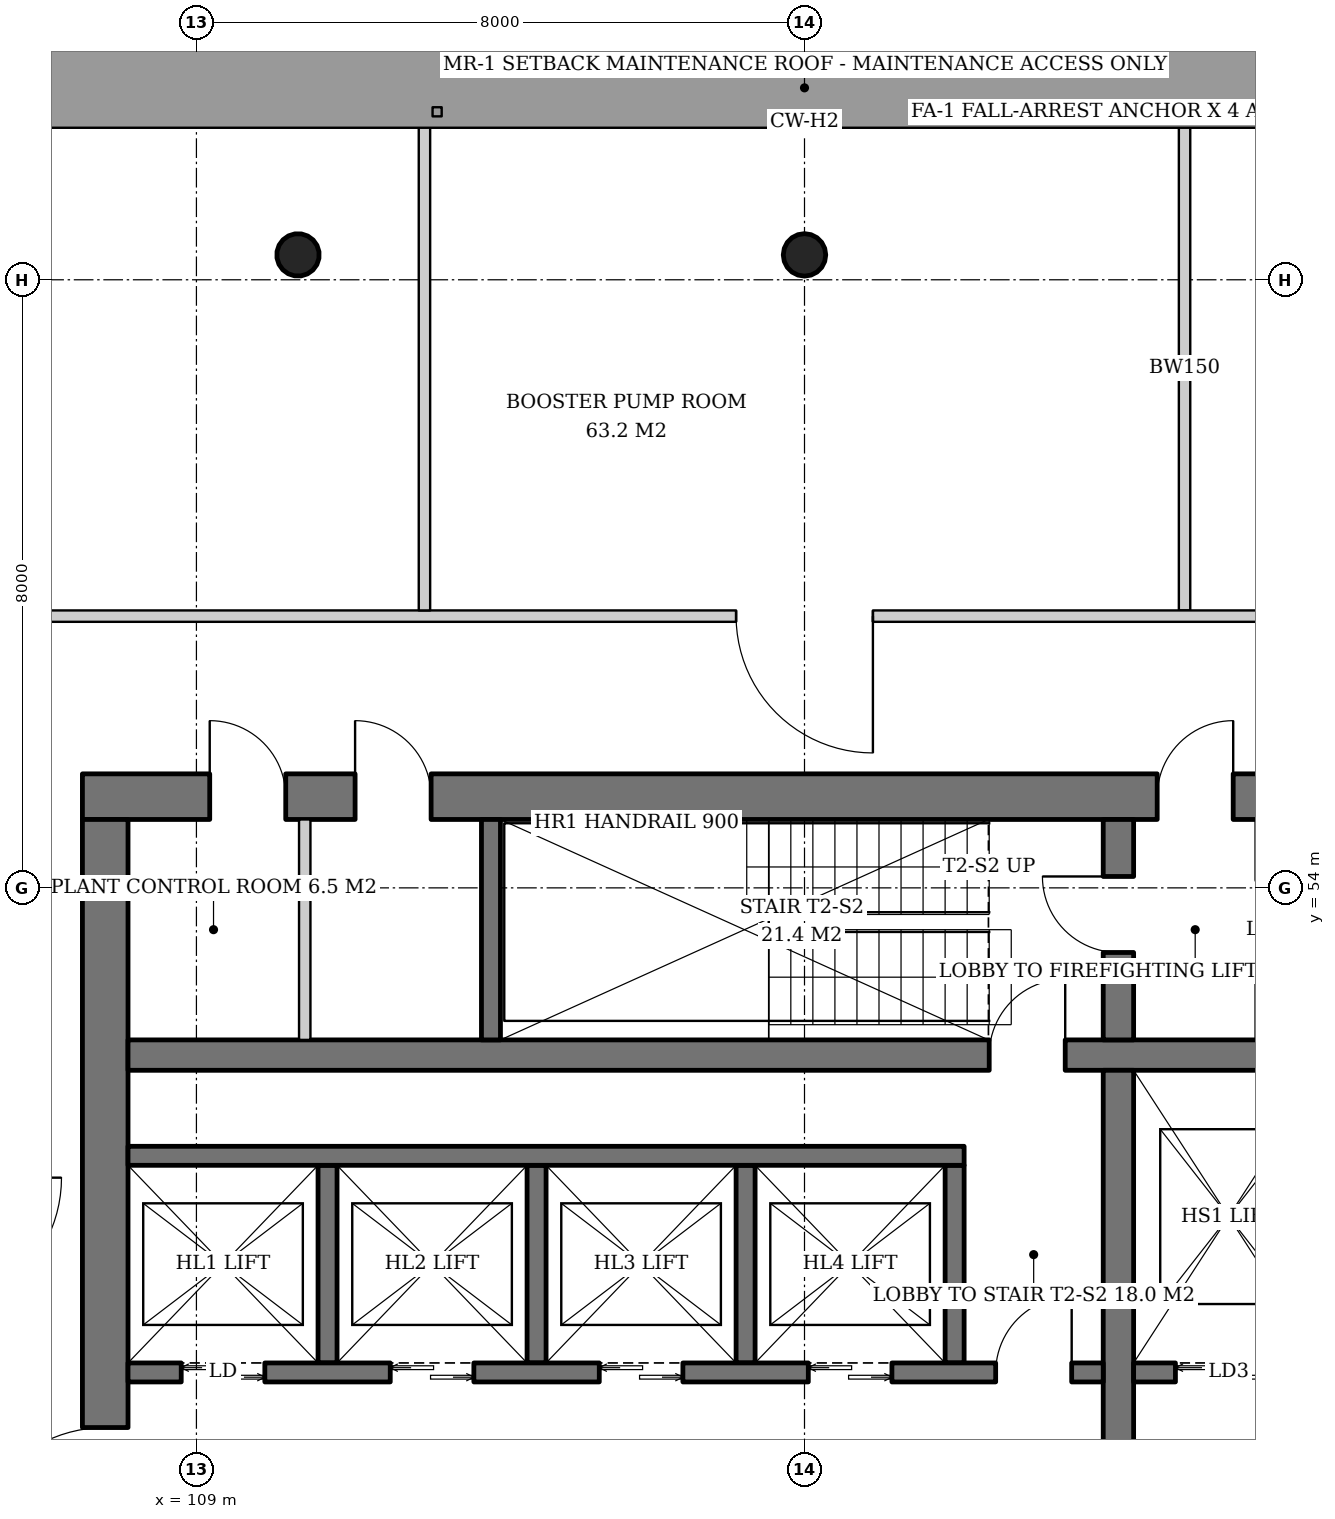
"""IFC4 building model, lengths in metres.
Left out: names, types, materials, properties, quantities, classifications, styles, units other than length and angle.
Written with IfcOpenShell. Run it as: python <this file> out.ifc"""

import sys

from ifc_helpers import new_model, si_unit, direction, frame, frame_2d, origin, origin_2d, place, context, subcontext, project, spatial, rectangle, hollow_circle, extrude, element, fill, save


model = new_model("IFC4")
c1 = context("Model", 3, precision=1e-05, world=origin(), true_north=direction((0.0, 1.0)))
c2 = subcontext(c1, "Body", "Model", "MODEL_VIEW")
j1 = project(units=[si_unit("LENGTHUNIT", "METRE"), si_unit("PLANEANGLEUNIT", "RADIAN")], contexts=[c1])
p1 = place(None, origin())
s1 = spatial("IfcSite", under=j1, at=p1, CompositionType="ELEMENT")
p2 = place(p1, origin())
s2 = spatial("IfcBuilding", under=s1, at=p2, CompositionType="ELEMENT")
p3 = place(p2, frame((0.0, 0.0, 81.8)))
s3 = spatial("IfcBuildingStorey", under=s2, at=p3, CompositionType="ELEMENT", Elevation=81.8)
p4 = place(p3, frame((117.0, 62.379, 0.0), z_axis=(0.0, -0.043069538298, 0.999072076915), x_axis=(1.0, 0.0, 0.0)))
e1 = element("IfcColumn", 1, at=p4, inside=s3, PredefinedType="COLUMN", context=c2, shape_type="SweptSolid", body=[
    extrude(hollow_circle(Radius=0.28, WallThickness=0.02, at=origin_2d()), origin(), (0.0, 0.0, 1.0), 3.803),
])
p5 = place(p3, frame((110.31, 62.379, 0.0), z_axis=(0.021561848751, -0.043059525333, 0.998839808957), x_axis=(0.894160516368, 0.44774654769, 0.0)))
e2 = element("IfcColumn", 2, at=p5, inside=s3, PredefinedType="COLUMN", context=c2, shape_type="SweptSolid", body=[
    extrude(hollow_circle(Radius=0.28, WallThickness=0.02, at=origin_2d()), origin(), (0.0, 0.0, 1.0), 3.804),
])
p6 = place(p3, frame((107.5, 55.2, 0.0), z_axis=(0.0, 0.0, 1.0), x_axis=(1.0, 0.0, 0.0)))
e3 = element("IfcWall", 3, at=p6, inside=s3, PredefinedType="SHEAR", context=c2, shape_type="SweptSolid", body=[
    extrude(rectangle(XDim=19.0, YDim=0.6, at=frame_2d((9.5, 0.0))), origin(), (0.0, 0.0, 1.0), 3.8),
])
p7 = place(p6, frame((14.14, 0.0, 0.0)))
e4 = element("IfcOpeningElement", 4, at=p7, cuts=e3, PredefinedType="OPENING", context=c2, shape_type="SweptSolid", body=[
    extrude(rectangle(XDim=1.0, YDim=2.1, at=frame_2d((0.5, 1.05))), frame((0.0, 0.31, 0.0), z_axis=(0.0, -1.0, 0.0), x_axis=(1.0, 0.0, 0.0)), (0.0, 0.0, 1.0), 0.62),
])
p8 = place(p6, frame((1.675, 0.0, 0.0)))
e5 = element("IfcOpeningElement", 5, at=p8, cuts=e3, PredefinedType="OPENING", context=c2, shape_type="SweptSolid", body=[
    extrude(rectangle(XDim=1.0, YDim=2.1, at=frame_2d((0.5, 1.05))), frame((0.0, 0.31, 0.0), z_axis=(0.0, -1.0, 0.0), x_axis=(1.0, 0.0, 0.0)), (0.0, 0.0, 1.0), 0.62),
])
p9 = place(p6, frame((3.587, 0.0, 0.0)))
e6 = element("IfcOpeningElement", 6, at=p9, cuts=e3, PredefinedType="OPENING", context=c2, shape_type="SweptSolid", body=[
    extrude(rectangle(XDim=1.0, YDim=2.1, at=frame_2d((0.5, 1.05))), frame((0.0, 0.31, 0.0), z_axis=(0.0, -1.0, 0.0), x_axis=(1.0, 0.0, 0.0)), (0.0, 0.0, 1.0), 0.62),
])
p10 = place(p3, frame((107.8, 37.1, 0.0), z_axis=(0.0, 0.0, 1.0), x_axis=(0.0, 1.0, 0.0)))
e7 = element("IfcWall", 7, at=p10, inside=s3, PredefinedType="SHEAR", context=c2, shape_type="SweptSolid", body=[
    extrude(rectangle(XDim=17.8, YDim=0.6, at=frame_2d((8.9, 0.0))), origin(), (0.0, 0.0, 1.0), 3.8),
])
p11 = place(p10, frame((8.0, 0.0, 0.0)))
e8 = element("IfcOpeningElement", 8, at=p11, cuts=e7, PredefinedType="OPENING", context=c2, shape_type="SweptSolid", body=[
    extrude(rectangle(XDim=1.8, YDim=2.4, at=frame_2d((0.9, 1.2))), frame((0.0, 0.31, 0.0), z_axis=(0.0, -1.0, 0.0), x_axis=(1.0, 0.0, 0.0)), (0.0, 0.0, 1.0), 0.62),
])
p12 = place(p3, frame((108.1, 51.8, 0.0), z_axis=(0.0, 0.0, 1.0), x_axis=(1.0, 0.0, 0.0)))
e9 = element("IfcWall", 9, at=p12, inside=s3, PredefinedType="SHEAR", context=c2, shape_type="SweptSolid", body=[
    extrude(rectangle(XDim=17.8, YDim=0.4, at=frame_2d((8.9, 0.0))), origin(), (0.0, 0.0, 1.0), 3.8),
])
p13 = place(p12, frame((11.33, 0.0, 0.0)))
e10 = element("IfcOpeningElement", 10, at=p13, cuts=e9, PredefinedType="OPENING", context=c2, shape_type="SweptSolid", body=[
    extrude(rectangle(XDim=1.0, YDim=2.1, at=frame_2d((0.5, 1.05))), frame((0.0, 0.21, 0.0), z_axis=(0.0, -1.0, 0.0), x_axis=(1.0, 0.0, 0.0)), (0.0, 0.0, 1.0), 0.42),
])
p14 = place(p3, frame((121.13, 40.4, 0.0), z_axis=(0.0, 0.0, 1.0), x_axis=(0.0, 1.0, 0.0)))
e11 = element("IfcWall", 11, at=p14, inside=s3, PredefinedType="SHEAR", context=c2, shape_type="SweptSolid", body=[
    extrude(rectangle(XDim=11.2, YDim=0.4, at=frame_2d((5.6, 0.0))), origin(), (0.0, 0.0, 1.0), 3.8),
])
p15 = place(p14, frame((5.1, 0.0, 0.0)))
e12 = element("IfcOpeningElement", 12, at=p15, cuts=e11, PredefinedType="OPENING", context=c2, shape_type="SweptSolid", body=[
    extrude(rectangle(XDim=1.0, YDim=2.1, at=frame_2d((0.5, 1.05))), frame((0.0, 0.21, 0.0), z_axis=(0.0, -1.0, 0.0), x_axis=(1.0, 0.0, 0.0)), (0.0, 0.0, 1.0), 0.42),
])
p16 = place(p3, frame((121.13, 52.0, 0.0), z_axis=(0.0, 0.0, 1.0), x_axis=(0.0, 1.0, 0.0)))
e13 = element("IfcWall", 13, at=p16, inside=s3, PredefinedType="SHEAR", context=c2, shape_type="SweptSolid", body=[
    extrude(rectangle(XDim=2.9, YDim=0.4, at=frame_2d((1.45, 0.0))), origin(), (0.0, 0.0, 1.0), 3.8),
])
p17 = place(p16, frame((1.15, 0.0, 0.0)))
e14 = element("IfcOpeningElement", 14, at=p17, cuts=e13, PredefinedType="OPENING", context=c2, shape_type="SweptSolid", body=[
    extrude(rectangle(XDim=1.0, YDim=2.1, at=frame_2d((0.5, 1.05))), frame((0.0, 0.21, 0.0), z_axis=(0.0, -1.0, 0.0), x_axis=(1.0, 0.0, 0.0)), (0.0, 0.0, 1.0), 0.42),
])
p18 = place(p3, frame((112.875, 52.0, 0.0), z_axis=(0.0, 0.0, 1.0), x_axis=(0.0, 1.0, 0.0)))
e15 = element("IfcWall", 15, at=p18, inside=s3, PredefinedType="SHEAR", context=c2, shape_type="SweptSolid", body=[
    extrude(rectangle(XDim=2.9, YDim=0.25, at=frame_2d((1.45, 0.0))), origin(), (0.0, 0.0, 1.0), 3.8),
])
for number, where, z_axis, x_axis in (
    (16, (110.725, 47.75, 0.0), (0.0, 0.0, 1.0), (0.0, 1.0, 0.0)),
    (17, (113.475, 47.75, 0.0), (0.0, 0.0, 1.0), (0.0, 1.0, 0.0)),
    (18, (116.225, 47.75, 0.0), (0.0, 0.0, 1.0), (0.0, 1.0, 0.0)),
    (19, (118.975, 47.75, 0.0), (0.0, 0.0, 1.0), (0.0, 1.0, 0.0)),
):
    element("IfcWall", number, at=place(p3, frame(where, z_axis=z_axis, x_axis=x_axis)), inside=s3, PredefinedType="SHEAR", context=c2, shape_type="SweptSolid", body=[
        extrude(rectangle(XDim=2.6, YDim=0.25, at=frame_2d((1.3, 0.0))), origin(), (0.0, 0.0, 1.0), 3.8),
    ])
p19 = place(p3, frame((108.1, 50.475, 0.0), z_axis=(0.0, 0.0, 1.0), x_axis=(1.0, 0.0, 0.0)))
e20 = element("IfcWall", 20, at=p19, inside=s3, PredefinedType="SHEAR", context=c2, shape_type="SweptSolid", body=[
    extrude(rectangle(XDim=11.0, YDim=0.25, at=frame_2d((5.5, 0.0))), origin(), (0.0, 0.0, 1.0), 3.8),
])
p20 = place(p3, frame((108.1, 47.625, 0.0), z_axis=(0.0, 0.0, 1.0), x_axis=(1.0, 0.0, 0.0)))
e21 = element("IfcWall", 21, at=p20, inside=s3, PredefinedType="SHEAR", context=c2, shape_type="SweptSolid", body=[
    extrude(rectangle(XDim=12.83, YDim=0.25, at=frame_2d((6.415, 0.0))), origin(), (0.0, 0.0, 1.0), 3.8),
])
p21 = place(p20, frame((0.7, 0.0, 0.0)))
e22 = element("IfcOpeningElement", 22, at=p21, cuts=e21, PredefinedType="OPENING", context=c2, shape_type="SweptSolid", body=[
    extrude(rectangle(XDim=1.1, YDim=2.2, at=frame_2d((0.55, 1.1))), frame((0.0, 0.135, 0.0), z_axis=(0.0, -1.0, 0.0), x_axis=(1.0, 0.0, 0.0)), (0.0, 0.0, 1.0), 0.27),
])
p22 = place(p20, frame((3.45, 0.0, 0.0)))
e23 = element("IfcOpeningElement", 23, at=p22, cuts=e21, PredefinedType="OPENING", context=c2, shape_type="SweptSolid", body=[
    extrude(rectangle(XDim=1.1, YDim=2.2, at=frame_2d((0.55, 1.1))), frame((0.0, 0.135, 0.0), z_axis=(0.0, -1.0, 0.0), x_axis=(1.0, 0.0, 0.0)), (0.0, 0.0, 1.0), 0.27),
])
p23 = place(p20, frame((6.2, 0.0, 0.0)))
e24 = element("IfcOpeningElement", 24, at=p23, cuts=e21, PredefinedType="OPENING", context=c2, shape_type="SweptSolid", body=[
    extrude(rectangle(XDim=1.1, YDim=2.2, at=frame_2d((0.55, 1.1))), frame((0.0, 0.135, 0.0), z_axis=(0.0, -1.0, 0.0), x_axis=(1.0, 0.0, 0.0)), (0.0, 0.0, 1.0), 0.27),
])
p24 = place(p20, frame((8.95, 0.0, 0.0)))
e25 = element("IfcOpeningElement", 25, at=p24, cuts=e21, PredefinedType="OPENING", context=c2, shape_type="SweptSolid", body=[
    extrude(rectangle(XDim=1.1, YDim=2.2, at=frame_2d((0.55, 1.1))), frame((0.0, 0.135, 0.0), z_axis=(0.0, -1.0, 0.0), x_axis=(1.0, 0.0, 0.0)), (0.0, 0.0, 1.0), 0.27),
])
p25 = place(p20, frame((11.415, 0.0, 0.0)))
e26 = element("IfcOpeningElement", 26, at=p25, cuts=e21, PredefinedType="OPENING", context=c2, shape_type="SweptSolid", body=[
    extrude(rectangle(XDim=1.0, YDim=2.1, at=frame_2d((0.5, 1.05))), frame((0.0, 0.135, 0.0), z_axis=(0.0, -1.0, 0.0), x_axis=(1.0, 0.0, 0.0)), (0.0, 0.0, 1.0), 0.27),
])
p26 = place(p3, frame((121.33, 47.625, 0.0), z_axis=(0.0, 0.0, 1.0), x_axis=(1.0, 0.0, 0.0)))
e27 = element("IfcWall", 27, at=p26, inside=s3, PredefinedType="SHEAR", context=c2, shape_type="SweptSolid", body=[
    extrude(rectangle(XDim=4.57, YDim=0.25, at=frame_2d((2.285, 0.0))), origin(), (0.0, 0.0, 1.0), 3.8),
])
p27 = place(p26, frame((0.55, 0.0, 0.0)))
e28 = element("IfcOpeningElement", 28, at=p27, cuts=e27, PredefinedType="OPENING", context=c2, shape_type="SweptSolid", body=[
    extrude(rectangle(XDim=1.4, YDim=2.4, at=frame_2d((0.7, 1.2))), frame((0.0, 0.135, 0.0), z_axis=(0.0, -1.0, 0.0), x_axis=(1.0, 0.0, 0.0)), (0.0, 0.0, 1.0), 0.27),
])
p28 = place(p26, frame((3.26, 0.0, 0.0)))
e29 = element("IfcOpeningElement", 29, at=p28, cuts=e27, PredefinedType="OPENING", context=c2, shape_type="SweptSolid", body=[
    extrude(rectangle(XDim=0.8, YDim=2.0, at=frame_2d((0.4, 1.0))), frame((0.0, 0.135, 0.0), z_axis=(0.0, -1.0, 0.0), x_axis=(1.0, 0.0, 0.0)), (0.0, 0.0, 1.0), 0.27),
])
p29 = place(p3, frame((110.425, 52.0, 0.0), z_axis=(0.0, 0.0, 1.0), x_axis=(0.0, 1.0, 0.0)))
e30 = element("IfcWall", 30, at=p29, inside=s3, PredefinedType="SOLIDWALL", context=c2, shape_type="SweptSolid", body=[
    extrude(rectangle(XDim=2.9, YDim=0.15, at=frame_2d((1.45, 0.0))), origin(), (0.0, 0.0, 1.0), 3.52),
])
p30 = place(p3, frame((122.0, 57.65, 0.0), z_axis=(0.0, 0.0, 1.0), x_axis=(0.0, 1.0, 0.0)))
e31 = element("IfcWall", 31, at=p30, inside=s3, PredefinedType="SOLIDWALL", context=c2, shape_type="SweptSolid", body=[
    extrude(rectangle(XDim=6.39, YDim=0.15, at=frame_2d((3.195, 0.0))), origin(), (0.0, 0.0, 1.0), 2.92),
])
p31 = place(p3, frame((128.65, 57.575, 0.0), z_axis=(0.0, 0.0, 1.0), x_axis=(-1.0, 0.0, 0.0)))
e32 = element("IfcWall", 32, at=p31, inside=s3, PredefinedType="PARTITIONING", context=c2, shape_type="SweptSolid", body=[
    extrude(rectangle(XDim=23.15, YDim=0.15, at=frame_2d((11.575, 0.0))), origin(), (0.0, 0.0, 1.0), 2.82),
])
p32 = place(p31, frame((2.462, 0.0, 0.0)))
e33 = element("IfcOpeningElement", 33, at=p32, cuts=e32, PredefinedType="OPENING", context=c2, shape_type="SweptSolid", body=[
    extrude(rectangle(XDim=1.8, YDim=2.4, at=frame_2d((0.9, 1.2))), frame((0.0, 0.085, 0.0), z_axis=(0.0, -1.0, 0.0), x_axis=(1.0, 0.0, 0.0)), (0.0, 0.0, 1.0), 0.17),
])
p33 = place(p31, frame((10.75, 0.0, 0.0)))
e34 = element("IfcOpeningElement", 34, at=p33, cuts=e32, PredefinedType="OPENING", context=c2, shape_type="SweptSolid", body=[
    extrude(rectangle(XDim=1.8, YDim=2.4, at=frame_2d((0.9, 1.2))), frame((0.0, 0.085, 0.0), z_axis=(0.0, -1.0, 0.0), x_axis=(1.0, 0.0, 0.0)), (0.0, 0.0, 1.0), 0.17),
])
p34 = place(p3, frame((112.0, 57.65, 0.0), z_axis=(0.0, 0.0, 1.0), x_axis=(0.0, 1.0, 0.0)))
e35 = element("IfcWall", 35, at=p34, inside=s3, PredefinedType="PARTITIONING", context=c2, shape_type="SweptSolid", body=[
    extrude(rectangle(XDim=6.39, YDim=0.15, at=frame_2d((3.195, 0.0))), origin(), (0.0, 0.0, 1.0), 3.12),
])
p35 = place(p21, origin())
e36 = element("IfcDoor", 36, at=p35, inside=s3, OperationType="DOUBLE_DOOR_SLIDING", PredefinedType="DOOR", context=c2, shape_type="SweptSolid", body=[
    extrude(rectangle(XDim=1.1, YDim=2.2, at=frame_2d((0.55, 1.1))), frame((0.0, 0.025, 0.0), z_axis=(0.0, -1.0, 0.0), x_axis=(1.0, 0.0, 0.0)), (0.0, 0.0, 1.0), 0.05),
])
fill(e22, e36)
p36 = place(p22, origin())
e37 = element("IfcDoor", 37, at=p36, inside=s3, OperationType="DOUBLE_DOOR_SLIDING", PredefinedType="DOOR", context=c2, shape_type="SweptSolid", body=[
    extrude(rectangle(XDim=1.1, YDim=2.2, at=frame_2d((0.55, 1.1))), frame((0.0, 0.025, 0.0), z_axis=(0.0, -1.0, 0.0), x_axis=(1.0, 0.0, 0.0)), (0.0, 0.0, 1.0), 0.05),
])
fill(e23, e37)
p37 = place(p23, origin())
e38 = element("IfcDoor", 38, at=p37, inside=s3, OperationType="DOUBLE_DOOR_SLIDING", PredefinedType="DOOR", context=c2, shape_type="SweptSolid", body=[
    extrude(rectangle(XDim=1.1, YDim=2.2, at=frame_2d((0.55, 1.1))), frame((0.0, 0.025, 0.0), z_axis=(0.0, -1.0, 0.0), x_axis=(1.0, 0.0, 0.0)), (0.0, 0.0, 1.0), 0.05),
])
fill(e24, e38)
p38 = place(p24, origin())
e39 = element("IfcDoor", 39, at=p38, inside=s3, OperationType="DOUBLE_DOOR_SLIDING", PredefinedType="DOOR", context=c2, shape_type="SweptSolid", body=[
    extrude(rectangle(XDim=1.1, YDim=2.2, at=frame_2d((0.55, 1.1))), frame((0.0, 0.025, 0.0), z_axis=(0.0, -1.0, 0.0), x_axis=(1.0, 0.0, 0.0)), (0.0, 0.0, 1.0), 0.05),
])
fill(e25, e39)
p39 = place(p25, origin())
e40 = element("IfcDoor", 40, at=p39, inside=s3, OperationType="SINGLE_SWING_RIGHT", PredefinedType="DOOR", context=c2, shape_type="SweptSolid", body=[
    extrude(rectangle(XDim=1.0, YDim=2.1, at=frame_2d((0.5, 1.05))), frame((0.0, 0.025, 0.0), z_axis=(0.0, -1.0, 0.0), x_axis=(1.0, 0.0, 0.0)), (0.0, 0.0, 1.0), 0.05),
])
fill(e26, e40)
p40 = place(p27, origin())
e41 = element("IfcDoor", 41, at=p40, inside=s3, OperationType="DOUBLE_DOOR_SLIDING", PredefinedType="DOOR", context=c2, shape_type="SweptSolid", body=[
    extrude(rectangle(XDim=1.4, YDim=2.4, at=frame_2d((0.7, 1.2))), frame((0.0, 0.025, 0.0), z_axis=(0.0, -1.0, 0.0), x_axis=(1.0, 0.0, 0.0)), (0.0, 0.0, 1.0), 0.05),
])
fill(e28, e41)
p41 = place(p17, origin())
e42 = element("IfcDoor", 42, at=p41, inside=s3, OperationType="SINGLE_SWING_RIGHT", PredefinedType="DOOR", context=c2, shape_type="SweptSolid", body=[
    extrude(rectangle(XDim=1.0, YDim=2.1, at=frame_2d((0.5, 1.05))), frame((0.0, 0.025, 0.0), z_axis=(0.0, -1.0, 0.0), x_axis=(1.0, 0.0, 0.0)), (0.0, 0.0, 1.0), 0.05),
])
fill(e14, e42)
p42 = place(p7, origin())
e43 = element("IfcDoor", 43, at=p42, inside=s3, OperationType="SINGLE_SWING_RIGHT", PredefinedType="DOOR", context=c2, shape_type="SweptSolid", body=[
    extrude(rectangle(XDim=1.0, YDim=2.1, at=frame_2d((0.5, 1.05))), frame((0.0, 0.025, 0.0), z_axis=(0.0, -1.0, 0.0), x_axis=(1.0, 0.0, 0.0)), (0.0, 0.0, 1.0), 0.05),
])
fill(e4, e43)
p43 = place(p11, origin())
e44 = element("IfcDoor", 44, at=p43, inside=s3, OperationType="DOUBLE_DOOR_SINGLE_SWING", PredefinedType="DOOR", context=c2, shape_type="SweptSolid", body=[
    extrude(rectangle(XDim=1.8, YDim=2.4, at=frame_2d((0.9, 1.2))), frame((0.0, 0.025, 0.0), z_axis=(0.0, -1.0, 0.0), x_axis=(1.0, 0.0, 0.0)), (0.0, 0.0, 1.0), 0.05),
])
fill(e8, e44)
p44 = place(p13, origin())
e45 = element("IfcDoor", 45, at=p44, inside=s3, OperationType="SINGLE_SWING_RIGHT", PredefinedType="DOOR", context=c2, shape_type="SweptSolid", body=[
    extrude(rectangle(XDim=1.0, YDim=2.1, at=frame_2d((0.5, 1.05))), frame((0.0, 0.025, 0.0), z_axis=(0.0, -1.0, 0.0), x_axis=(1.0, 0.0, 0.0)), (0.0, 0.0, 1.0), 0.05),
])
fill(e10, e45)
p45 = place(p8, origin())
e46 = element("IfcDoor", 46, at=p45, inside=s3, OperationType="SINGLE_SWING_LEFT", PredefinedType="DOOR", context=c2, shape_type="SweptSolid", body=[
    extrude(rectangle(XDim=1.0, YDim=2.1, at=frame_2d((0.5, 1.05))), frame((0.0, -0.24, 0.0), z_axis=(0.0, -1.0, 0.0), x_axis=(1.0, 0.0, 0.0)), (0.0, 0.0, 1.0), 0.05),
])
fill(e5, e46)
p46 = place(p9, origin())
e47 = element("IfcDoor", 47, at=p46, inside=s3, OperationType="SINGLE_SWING_LEFT", PredefinedType="DOOR", context=c2, shape_type="SweptSolid", body=[
    extrude(rectangle(XDim=1.0, YDim=2.1, at=frame_2d((0.5, 1.05))), frame((0.0, -0.24, 0.0), z_axis=(0.0, -1.0, 0.0), x_axis=(1.0, 0.0, 0.0)), (0.0, 0.0, 1.0), 0.05),
])
fill(e6, e47)
p47 = place(p33, origin())
e48 = element("IfcDoor", 48, at=p47, inside=s3, OperationType="DOUBLE_DOOR_SINGLE_SWING", PredefinedType="DOOR", context=c2, shape_type="SweptSolid", body=[
    extrude(rectangle(XDim=1.8, YDim=2.4, at=frame_2d((0.9, 1.2))), frame((0.0, 0.025, 0.0), z_axis=(0.0, -1.0, 0.0), x_axis=(1.0, 0.0, 0.0)), (0.0, 0.0, 1.0), 0.05),
])
fill(e34, e48)
save(model, sys.argv[1])
